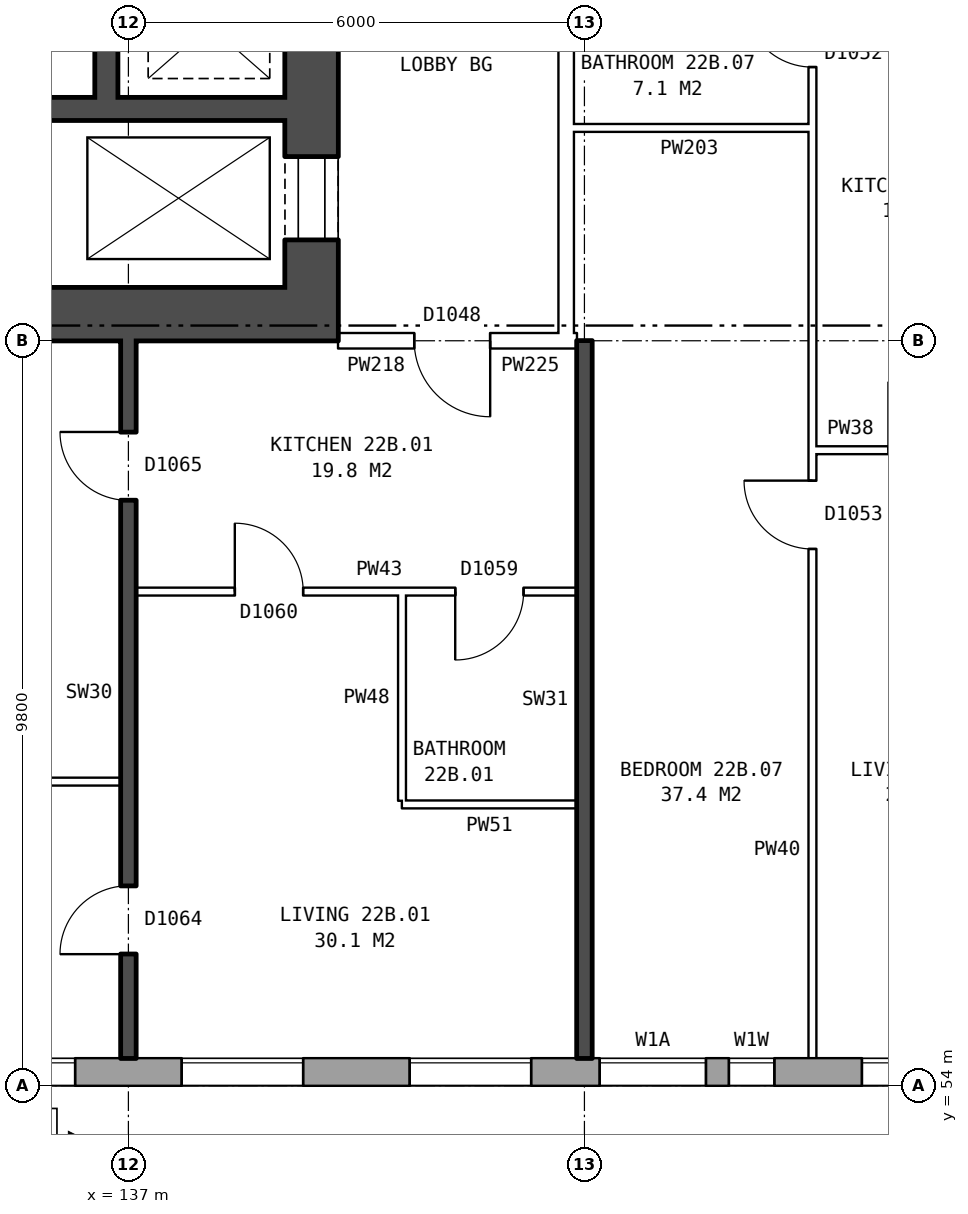
"""IFC4 building model, lengths in metres.
Left out: names, types, materials, properties, quantities, classifications, styles, units other than length and angle.
Written with IfcOpenShell. Run it as: python <this file> out.ifc"""

import sys

from ifc_helpers import new_model, si_unit, direction, frame, frame_2d, origin, place, context, subcontext, project, spatial, rectangle, extrude, element, fill, save


model = new_model("IFC4")
c1 = context("Model", 3, precision=1e-05, world=origin(), true_north=direction((0.0, 1.0)))
c2 = subcontext(c1, "Body", "Model", "MODEL_VIEW")
j1 = project(units=[si_unit("LENGTHUNIT", "METRE"), si_unit("PLANEANGLEUNIT", "RADIAN")], contexts=[c1])
p1 = place(None, origin())
s1 = spatial("IfcSite", under=j1, at=p1, CompositionType="ELEMENT")
p2 = place(p1, origin())
s2 = spatial("IfcBuilding", under=s1, at=p2, CompositionType="ELEMENT")
p3 = place(p2, frame((0.0, 0.0, 80.9)))
s3 = spatial("IfcBuildingStorey", under=s2, at=p3, CompositionType="ELEMENT", Elevation=80.9)
p4 = place(p3, frame((134.075, 54.18, 0.0), z_axis=(0.0, 0.0, 1.0), x_axis=(1.0, 0.0, 0.0)))
e1 = element("IfcWall", 1, at=p4, inside=s3, PredefinedType="STANDARD", context=c2, shape_type="SweptSolid", body=[
    extrude(rectangle(XDim=38.101, YDim=0.36, at=frame_2d((19.05, 0.0))), origin(), (0.0, 0.0, 1.0), 2.85),
])
p5 = place(p4, frame((0.625, 0.0, 0.8)))
e2 = element("IfcOpeningElement", 2, at=p5, cuts=e1, PredefinedType="OPENING", context=c2, shape_type="SweptSolid", body=[
    extrude(rectangle(XDim=1.6, YDim=1.8, at=frame_2d((0.8, 0.9))), frame((0.0, 0.19, 0.0), z_axis=(0.0, -1.0, 0.0), x_axis=(1.0, 0.0, 0.0)), (0.0, 0.0, 1.0), 0.38),
])
p6 = place(p4, frame((3.625, 0.0, 0.8)))
e3 = element("IfcOpeningElement", 3, at=p6, cuts=e1, PredefinedType="OPENING", context=c2, shape_type="SweptSolid", body=[
    extrude(rectangle(XDim=1.6, YDim=1.8, at=frame_2d((0.8, 0.9))), frame((0.0, 0.19, 0.0), z_axis=(0.0, -1.0, 0.0), x_axis=(1.0, 0.0, 0.0)), (0.0, 0.0, 1.0), 0.38),
])
p7 = place(p4, frame((6.625, 0.0, 0.8)))
e4 = element("IfcOpeningElement", 4, at=p7, cuts=e1, PredefinedType="OPENING", context=c2, shape_type="SweptSolid", body=[
    extrude(rectangle(XDim=1.6, YDim=1.8, at=frame_2d((0.8, 0.9))), frame((0.0, 0.19, 0.0), z_axis=(0.0, -1.0, 0.0), x_axis=(1.0, 0.0, 0.0)), (0.0, 0.0, 1.0), 0.38),
])
p8 = place(p4, frame((9.125, 0.0, 0.8)))
e5 = element("IfcOpeningElement", 5, at=p8, cuts=e1, PredefinedType="OPENING", context=c2, shape_type="SweptSolid", body=[
    extrude(rectangle(XDim=1.4, YDim=1.8, at=frame_2d((0.7, 0.9))), frame((0.0, 0.19, 0.0), z_axis=(0.0, -1.0, 0.0), x_axis=(1.0, 0.0, 0.0)), (0.0, 0.0, 1.0), 0.38),
])
p9 = place(p4, frame((12.575, 0.0, 0.8)))
e6 = element("IfcOpeningElement", 6, at=p9, cuts=e1, PredefinedType="OPENING", context=c2, shape_type="SweptSolid", body=[
    extrude(rectangle(XDim=0.6, YDim=0.9, at=frame_2d((0.3, 0.45))), frame((0.0, 0.19, 0.0), z_axis=(0.0, -1.0, 0.0), x_axis=(1.0, 0.0, 0.0)), (0.0, 0.0, 1.0), 0.38),
])
p10 = place(p4, frame((15.625, 0.0, 0.8)))
e7 = element("IfcOpeningElement", 7, at=p10, cuts=e1, PredefinedType="OPENING", context=c2, shape_type="SweptSolid", body=[
    extrude(rectangle(XDim=1.6, YDim=1.8, at=frame_2d((0.8, 0.9))), frame((0.0, 0.19, 0.0), z_axis=(0.0, -1.0, 0.0), x_axis=(1.0, 0.0, 0.0)), (0.0, 0.0, 1.0), 0.38),
])
p11 = place(p4, frame((18.625, 0.0, 0.8)))
e8 = element("IfcOpeningElement", 8, at=p11, cuts=e1, PredefinedType="OPENING", context=c2, shape_type="SweptSolid", body=[
    extrude(rectangle(XDim=1.6, YDim=1.8, at=frame_2d((0.8, 0.9))), frame((0.0, 0.19, 0.0), z_axis=(0.0, -1.0, 0.0), x_axis=(1.0, 0.0, 0.0)), (0.0, 0.0, 1.0), 0.38),
])
p12 = place(p4, frame((21.625, 0.0, 0.8)))
e9 = element("IfcOpeningElement", 9, at=p12, cuts=e1, PredefinedType="OPENING", context=c2, shape_type="SweptSolid", body=[
    extrude(rectangle(XDim=1.6, YDim=1.8, at=frame_2d((0.8, 0.9))), frame((0.0, 0.19, 0.0), z_axis=(0.0, -1.0, 0.0), x_axis=(1.0, 0.0, 0.0)), (0.0, 0.0, 1.0), 0.38),
])
p13 = place(p4, frame((23.525, 0.0, 0.8)))
e10 = element("IfcOpeningElement", 10, at=p13, cuts=e1, PredefinedType="OPENING", context=c2, shape_type="SweptSolid", body=[
    extrude(rectangle(XDim=1.0, YDim=1.8, at=frame_2d((0.5, 0.9))), frame((0.0, 0.19, 0.0), z_axis=(0.0, -1.0, 0.0), x_axis=(1.0, 0.0, 0.0)), (0.0, 0.0, 1.0), 0.38),
])
p14 = place(p4, frame((27.625, 0.0, 0.8)))
e11 = element("IfcOpeningElement", 11, at=p14, cuts=e1, PredefinedType="OPENING", context=c2, shape_type="SweptSolid", body=[
    extrude(rectangle(XDim=1.6, YDim=1.8, at=frame_2d((0.8, 0.9))), frame((0.0, 0.19, 0.0), z_axis=(0.0, -1.0, 0.0), x_axis=(1.0, 0.0, 0.0)), (0.0, 0.0, 1.0), 0.38),
])
p15 = place(p4, frame((30.625, 0.0, 0.8)))
e12 = element("IfcOpeningElement", 12, at=p15, cuts=e1, PredefinedType="OPENING", context=c2, shape_type="SweptSolid", body=[
    extrude(rectangle(XDim=1.6, YDim=1.8, at=frame_2d((0.8, 0.9))), frame((0.0, 0.19, 0.0), z_axis=(0.0, -1.0, 0.0), x_axis=(1.0, 0.0, 0.0)), (0.0, 0.0, 1.0), 0.38),
])
p16 = place(p4, frame((33.625, 0.0, 0.8)))
e13 = element("IfcOpeningElement", 13, at=p16, cuts=e1, PredefinedType="OPENING", context=c2, shape_type="SweptSolid", body=[
    extrude(rectangle(XDim=1.6, YDim=1.8, at=frame_2d((0.8, 0.9))), frame((0.0, 0.19, 0.0), z_axis=(0.0, -1.0, 0.0), x_axis=(1.0, 0.0, 0.0)), (0.0, 0.0, 1.0), 0.38),
])
p17 = place(p4, frame((10.825, 0.0, 1.7)))
e14 = element("IfcOpeningElement", 14, at=p17, cuts=e1, PredefinedType="OPENING", context=c2, shape_type="SweptSolid", body=[
    extrude(rectangle(XDim=0.6, YDim=0.9, at=frame_2d((0.3, 0.45))), frame((0.0, 0.19, 0.0), z_axis=(0.0, -1.0, 0.0), x_axis=(1.0, 0.0, 0.0)), (0.0, 0.0, 1.0), 0.38),
])
p18 = place(p4, frame((13.475, 0.0, 0.8)))
e15 = element("IfcOpeningElement", 15, at=p18, cuts=e1, PredefinedType="OPENING", context=c2, shape_type="SweptSolid", body=[
    extrude(rectangle(XDim=1.2, YDim=1.8, at=frame_2d((0.6, 0.9))), frame((0.0, 0.19, 0.0), z_axis=(0.0, -1.0, 0.0), x_axis=(1.0, 0.0, 0.0)), (0.0, 0.0, 1.0), 0.38),
])
p19 = place(p4, frame((24.825, 0.0, 0.8)))
e16 = element("IfcOpeningElement", 16, at=p19, cuts=e1, PredefinedType="OPENING", context=c2, shape_type="SweptSolid", body=[
    extrude(rectangle(XDim=0.6, YDim=0.9, at=frame_2d((0.3, 0.45))), frame((0.0, 0.19, 0.0), z_axis=(0.0, -1.0, 0.0), x_axis=(1.0, 0.0, 0.0)), (0.0, 0.0, 1.0), 0.38),
])
p20 = place(p3, frame((139.41, 64.5, 0.0), z_axis=(0.0, 0.0, 1.0), x_axis=(0.0, 1.0, 0.0)))
e17 = element("IfcWall", 17, at=p20, inside=s3, PredefinedType="SHEAR", context=c2, shape_type="SweptSolid", body=[
    extrude(rectangle(XDim=11.0, YDim=0.7, at=frame_2d((5.5, 0.0))), origin(), (0.0, 0.0, 1.0), 2.85),
])
p21 = place(p20, frame((0.625, 0.0, 0.0)))
e18 = element("IfcOpeningElement", 18, at=p21, cuts=e17, PredefinedType="OPENING", context=c2, shape_type="SweptSolid", body=[
    extrude(rectangle(XDim=1.1, YDim=2.1, at=frame_2d((0.55, 1.05))), frame((0.0, 0.36, 0.0), z_axis=(0.0, -1.0, 0.0), x_axis=(1.0, 0.0, 0.0)), (0.0, 0.0, 1.0), 0.72),
])
p22 = place(p20, frame((9.2, 0.0, 0.0)))
e19 = element("IfcOpeningElement", 19, at=p22, cuts=e17, PredefinedType="OPENING", context=c2, shape_type="SweptSolid", body=[
    extrude(rectangle(XDim=1.1, YDim=2.1, at=frame_2d((0.55, 1.05))), frame((0.0, 0.36, 0.0), z_axis=(0.0, -1.0, 0.0), x_axis=(1.0, 0.0, 0.0)), (0.0, 0.0, 1.0), 0.72),
])
p23 = place(p20, frame((7.425, 0.0, 0.0)))
e20 = element("IfcOpeningElement", 20, at=p23, cuts=e17, PredefinedType="OPENING", context=c2, shape_type="SweptSolid", body=[
    extrude(rectangle(XDim=0.85, YDim=2.1, at=frame_2d((0.425, 1.05))), frame((0.0, 0.36, 0.0), z_axis=(0.0, -1.0, 0.0), x_axis=(1.0, 0.0, 0.0)), (0.0, 0.0, 1.0), 0.72),
])
p24 = place(p3, frame((139.76, 64.15, 0.0), z_axis=(0.0, 0.0, 1.0), x_axis=(-1.0, 0.0, 0.0)))
e21 = element("IfcWall", 21, at=p24, inside=s3, PredefinedType="SHEAR", context=c2, shape_type="SweptSolid", body=[
    extrude(rectangle(XDim=8.4, YDim=0.7, at=frame_2d((4.2, 0.0))), origin(), (0.0, 0.0, 1.0), 2.85),
])
p25 = place(p3, frame((139.06, 66.85, 0.0), z_axis=(0.0, 0.0, 1.0), x_axis=(-1.0, 0.0, 0.0)))
e22 = element("IfcWall", 22, at=p25, inside=s3, PredefinedType="SHEAR", context=c2, shape_type="SweptSolid", body=[
    extrude(rectangle(XDim=4.15, YDim=0.3, at=frame_2d((2.075, 0.0))), origin(), (0.0, 0.0, 1.0), 2.85),
])
p26 = place(p3, frame((136.71, 67.0, 0.0), z_axis=(0.0, 0.0, 1.0), x_axis=(0.0, 1.0, 0.0)))
e23 = element("IfcWall", 23, at=p26, inside=s3, PredefinedType="SHEAR", context=c2, shape_type="SweptSolid", body=[
    extrude(rectangle(XDim=4.1, YDim=0.3, at=frame_2d((2.05, 0.0))), origin(), (0.0, 0.0, 1.0), 2.85),
])
p27 = place(p3, frame((142.76, 63.9, 0.0), z_axis=(0.0, 0.0, 1.0), x_axis=(0.0, 1.0, 0.0)))
e24 = element("IfcWall", 24, at=p27, inside=s3, PredefinedType="PARTITIONING", context=c2, shape_type="SweptSolid", body=[
    extrude(rectangle(XDim=12.2, YDim=0.2, at=frame_2d((6.1, 0.0))), origin(), (0.0, 0.0, 1.0), 2.85),
])
p28 = place(p27, frame((5.1, 0.0, 0.0)))
e25 = element("IfcOpeningElement", 25, at=p28, cuts=e24, PredefinedType="OPENING", context=c2, shape_type="SweptSolid", body=[
    extrude(rectangle(XDim=2.0, YDim=2.1, at=frame_2d((1.0, 1.05))), frame((0.0, 0.11, 0.0), z_axis=(0.0, -1.0, 0.0), x_axis=(1.0, 0.0, 0.0)), (0.0, 0.0, 1.0), 0.22),
])
p29 = place(p3, frame((140.6, 57.7, 0.0), z_axis=(0.0, 0.0, 1.0), x_axis=(1.0, 0.0, 0.0)))
e26 = element("IfcWall", 26, at=p29, inside=s3, PredefinedType="PARTITIONING", context=c2, shape_type="SweptSolid", body=[
    extrude(rectangle(XDim=2.3, YDim=0.1, at=frame_2d((1.15, 0.0))), origin(), (0.0, 0.0, 1.0), 2.85),
])
p30 = place(p3, frame((131.36, 58.0, 0.0), z_axis=(0.0, 0.0, 1.0), x_axis=(1.0, 0.0, 0.0)))
e27 = element("IfcWall", 27, at=p30, inside=s3, PredefinedType="PARTITIONING", context=c2, shape_type="SweptSolid", body=[
    extrude(rectangle(XDim=5.54, YDim=0.1, at=frame_2d((2.77, 0.0))), origin(), (0.0, 0.0, 1.0), 2.85),
])
p31 = place(p3, frame((137.1, 60.5, 0.0), z_axis=(0.0, 0.0, 1.0), x_axis=(1.0, 0.0, 0.0)))
e28 = element("IfcWall", 28, at=p31, inside=s3, PredefinedType="PARTITIONING", context=c2, shape_type="SweptSolid", body=[
    extrude(rectangle(XDim=5.8, YDim=0.1, at=frame_2d((2.9, 0.0))), origin(), (0.0, 0.0, 1.0), 2.85),
])
p32 = place(p31, frame((1.3, 0.0, 0.0)))
e29 = element("IfcOpeningElement", 29, at=p32, cuts=e28, PredefinedType="OPENING", context=c2, shape_type="SweptSolid", body=[
    extrude(rectangle(XDim=0.9, YDim=2.1, at=frame_2d((0.45, 1.05))), frame((0.0, 0.06, 0.0), z_axis=(0.0, -1.0, 0.0), x_axis=(1.0, 0.0, 0.0)), (0.0, 0.0, 1.0), 0.12),
])
p33 = place(p31, frame((4.2, 0.0, 0.0)))
e30 = element("IfcOpeningElement", 30, at=p33, cuts=e28, PredefinedType="OPENING", context=c2, shape_type="SweptSolid", body=[
    extrude(rectangle(XDim=0.9, YDim=2.1, at=frame_2d((0.45, 1.05))), frame((0.0, 0.06, 0.0), z_axis=(0.0, -1.0, 0.0), x_axis=(1.0, 0.0, 0.0)), (0.0, 0.0, 1.0), 0.12),
])
p34 = place(p3, frame((146.0, 62.36, 0.0), z_axis=(0.0, 0.0, 1.0), x_axis=(1.0, 0.0, 0.0)))
e31 = element("IfcWall", 31, at=p34, inside=s3, PredefinedType="PARTITIONING", context=c2, shape_type="SweptSolid", body=[
    extrude(rectangle(XDim=2.9, YDim=0.1, at=frame_2d((1.45, 0.0))), origin(), (0.0, 0.0, 1.0), 2.85),
])
p35 = place(p34, frame((1.0, 0.0, 0.0)))
e32 = element("IfcOpeningElement", 32, at=p35, cuts=e31, PredefinedType="OPENING", context=c2, shape_type="SweptSolid", body=[
    extrude(rectangle(XDim=0.9, YDim=2.1, at=frame_2d((0.45, 1.05))), frame((0.0, 0.06, 0.0), z_axis=(0.0, -1.0, 0.0), x_axis=(1.0, 0.0, 0.0)), (0.0, 0.0, 1.0), 0.12),
])
p36 = place(p3, frame((139.76, 63.8, 0.0), z_axis=(0.0, 0.0, 1.0), x_axis=(1.0, 0.0, 0.0)))
e33 = element("IfcWall", 33, at=p36, inside=s3, PredefinedType="PARTITIONING", context=c2, shape_type="SweptSolid", body=[
    extrude(rectangle(XDim=3.0, YDim=0.2, at=frame_2d((1.5, 0.0))), origin(), (0.0, 0.0, 1.0), 2.85),
])
p37 = place(p36, frame((1.0, 0.0, 0.0)))
e34 = element("IfcOpeningElement", 34, at=p37, cuts=e33, PredefinedType="OPENING", context=c2, shape_type="SweptSolid", body=[
    extrude(rectangle(XDim=1.0, YDim=2.1, at=frame_2d((0.5, 1.05))), frame((0.0, 0.11, 0.0), z_axis=(0.0, -1.0, 0.0), x_axis=(1.0, 0.0, 0.0)), (0.0, 0.0, 1.0), 0.22),
])
p38 = place(p3, frame((142.76, 63.8, 0.0), z_axis=(0.0, 0.0, 1.0), x_axis=(1.0, 0.0, 0.0)))
e35 = element("IfcWall", 35, at=p38, inside=s3, PredefinedType="PARTITIONING", context=c2, shape_type="SweptSolid", body=[
    extrude(rectangle(XDim=0.14, YDim=0.2, at=frame_2d((0.07, 0.0))), origin(), (0.0, 0.0, 1.0), 2.85),
])
p39 = place(p3, frame((142.76, 66.6, 0.0), z_axis=(0.0, 0.0, 1.0), x_axis=(1.0, 0.0, 0.0)))
e36 = element("IfcWall", 36, at=p39, inside=s3, PredefinedType="PARTITIONING", context=c2, shape_type="SweptSolid", body=[
    extrude(rectangle(XDim=3.24, YDim=0.1, at=frame_2d((1.62, 0.0))), origin(), (0.0, 0.0, 1.0), 2.85),
])
p40 = place(p3, frame((137.0, 54.36, 0.0), z_axis=(0.0, 0.0, 1.0), x_axis=(0.0, 1.0, 0.0)))
e37 = element("IfcWall", 37, at=p40, inside=s3, PredefinedType="SOLIDWALL", context=c2, shape_type="SweptSolid", body=[
    extrude(rectangle(XDim=9.44, YDim=0.2, at=frame_2d((4.72, 0.0))), origin(), (0.0, 0.0, 1.0), 2.85),
])
p41 = place(p40, frame((1.37, 0.0, 0.0)))
e38 = element("IfcOpeningElement", 38, at=p41, cuts=e37, PredefinedType="OPENING", context=c2, shape_type="SweptSolid", body=[
    extrude(rectangle(XDim=0.9, YDim=2.1, at=frame_2d((0.45, 1.05))), frame((0.0, 0.11, 0.0), z_axis=(0.0, -1.0, 0.0), x_axis=(1.0, 0.0, 0.0)), (0.0, 0.0, 1.0), 0.22),
])
p42 = place(p40, frame((7.34, 0.0, 0.0)))
e39 = element("IfcOpeningElement", 39, at=p42, cuts=e37, PredefinedType="OPENING", context=c2, shape_type="SweptSolid", body=[
    extrude(rectangle(XDim=0.9, YDim=2.1, at=frame_2d((0.45, 1.05))), frame((0.0, 0.11, 0.0), z_axis=(0.0, -1.0, 0.0), x_axis=(1.0, 0.0, 0.0)), (0.0, 0.0, 1.0), 0.22),
])
p43 = place(p3, frame((140.6, 57.75, 0.0), z_axis=(0.0, 0.0, 1.0), x_axis=(0.0, 1.0, 0.0)))
e40 = element("IfcWall", 40, at=p43, inside=s3, PredefinedType="PARTITIONING", context=c2, shape_type="SweptSolid", body=[
    extrude(rectangle(XDim=2.7, YDim=0.1, at=frame_2d((1.35, 0.0))), origin(), (0.0, 0.0, 1.0), 2.85),
])
p44 = place(p3, frame((143.0, 54.36, 0.0), z_axis=(0.0, 0.0, 1.0), x_axis=(0.0, 1.0, 0.0)))
e41 = element("IfcWall", 41, at=p44, inside=s3, PredefinedType="SOLIDWALL", context=c2, shape_type="SweptSolid", body=[
    extrude(rectangle(XDim=9.44, YDim=0.2, at=frame_2d((4.72, 0.0))), origin(), (0.0, 0.0, 1.0), 2.85),
])
p45 = place(p3, frame((146.0, 54.36, 0.0), z_axis=(0.0, 0.0, 1.0), x_axis=(0.0, 1.0, 0.0)))
e42 = element("IfcWall", 42, at=p45, inside=s3, PredefinedType="PARTITIONING", context=c2, shape_type="SweptSolid", body=[
    extrude(rectangle(XDim=14.34, YDim=0.1, at=frame_2d((7.17, 0.0))), origin(), (0.0, 0.0, 1.0), 2.85),
])
p46 = place(p45, frame((6.7, 0.0, 0.0)))
e43 = element("IfcOpeningElement", 43, at=p46, cuts=e42, PredefinedType="OPENING", context=c2, shape_type="SweptSolid", body=[
    extrude(rectangle(XDim=0.9, YDim=2.1, at=frame_2d((0.45, 1.05))), frame((0.0, 0.06, 0.0), z_axis=(0.0, -1.0, 0.0), x_axis=(1.0, 0.0, 0.0)), (0.0, 0.0, 1.0), 0.12),
])
p47 = place(p45, frame((13.04, 0.0, 0.0)))
e44 = element("IfcOpeningElement", 44, at=p47, cuts=e42, PredefinedType="OPENING", context=c2, shape_type="SweptSolid", body=[
    extrude(rectangle(XDim=0.9, YDim=2.1, at=frame_2d((0.45, 1.05))), frame((0.0, 0.06, 0.0), z_axis=(0.0, -1.0, 0.0), x_axis=(1.0, 0.0, 0.0)), (0.0, 0.0, 1.0), 0.12),
])
p48 = place(p5, origin())
e45 = element("IfcWindow", 45, at=p48, inside=s3, PartitioningType="SINGLE_PANEL", PredefinedType="WINDOW", context=c2, shape_type="SweptSolid", body=[
    extrude(rectangle(XDim=1.6, YDim=1.8, at=frame_2d((0.8, 0.9))), frame((0.0, 0.15, 0.0), z_axis=(0.0, -1.0, 0.0), x_axis=(1.0, 0.0, 0.0)), (0.0, 0.0, 1.0), 0.06),
])
fill(e2, e45)
p49 = place(p6, origin())
e46 = element("IfcWindow", 46, at=p49, inside=s3, PartitioningType="SINGLE_PANEL", PredefinedType="WINDOW", context=c2, shape_type="SweptSolid", body=[
    extrude(rectangle(XDim=1.6, YDim=1.8, at=frame_2d((0.8, 0.9))), frame((0.0, 0.15, 0.0), z_axis=(0.0, -1.0, 0.0), x_axis=(1.0, 0.0, 0.0)), (0.0, 0.0, 1.0), 0.06),
])
fill(e3, e46)
p50 = place(p7, origin())
e47 = element("IfcWindow", 47, at=p50, inside=s3, PartitioningType="SINGLE_PANEL", PredefinedType="WINDOW", context=c2, shape_type="SweptSolid", body=[
    extrude(rectangle(XDim=1.6, YDim=1.8, at=frame_2d((0.8, 0.9))), frame((0.0, 0.15, 0.0), z_axis=(0.0, -1.0, 0.0), x_axis=(1.0, 0.0, 0.0)), (0.0, 0.0, 1.0), 0.06),
])
fill(e4, e47)
p51 = place(p8, origin())
e48 = element("IfcWindow", 48, at=p51, inside=s3, PartitioningType="SINGLE_PANEL", PredefinedType="WINDOW", context=c2, shape_type="SweptSolid", body=[
    extrude(rectangle(XDim=1.4, YDim=1.8, at=frame_2d((0.7, 0.9))), frame((0.0, 0.15, 0.0), z_axis=(0.0, -1.0, 0.0), x_axis=(1.0, 0.0, 0.0)), (0.0, 0.0, 1.0), 0.06),
])
fill(e5, e48)
p52 = place(p9, origin())
e49 = element("IfcWindow", 49, at=p52, inside=s3, PartitioningType="SINGLE_PANEL", PredefinedType="WINDOW", context=c2, shape_type="SweptSolid", body=[
    extrude(rectangle(XDim=0.6, YDim=0.9, at=frame_2d((0.3, 0.45))), frame((0.0, 0.15, 0.0), z_axis=(0.0, -1.0, 0.0), x_axis=(1.0, 0.0, 0.0)), (0.0, 0.0, 1.0), 0.06),
])
fill(e6, e49)
p53 = place(p21, origin())
e50 = element("IfcDoor", 50, at=p53, inside=s3, OperationType="DOUBLE_DOOR_SLIDING", PredefinedType="DOOR", context=c2, shape_type="SweptSolid", body=[
    extrude(rectangle(XDim=1.1, YDim=2.1, at=frame_2d((0.55, 1.05))), frame((0.0, 0.335, 0.0), z_axis=(0.0, -1.0, 0.0), x_axis=(1.0, 0.0, 0.0)), (0.0, 0.0, 1.0), 0.05),
])
fill(e18, e50)
p54 = place(p41, origin())
e51 = element("IfcDoor", 51, at=p54, inside=s3, OperationType="SINGLE_SWING_LEFT", PredefinedType="DOOR", context=c2, shape_type="SweptSolid", body=[
    extrude(rectangle(XDim=0.9, YDim=2.1, at=frame_2d((0.45, 1.05))), frame((0.0, 0.025, 0.0), z_axis=(0.0, -1.0, 0.0), x_axis=(1.0, 0.0, 0.0)), (0.0, 0.0, 1.0), 0.05),
])
fill(e38, e51)
p55 = place(p42, origin())
e52 = element("IfcDoor", 52, at=p55, inside=s3, OperationType="SINGLE_SWING_RIGHT", PredefinedType="DOOR", context=c2, shape_type="SweptSolid", body=[
    extrude(rectangle(XDim=0.9, YDim=2.1, at=frame_2d((0.45, 1.05))), frame((0.0, 0.025, 0.0), z_axis=(0.0, -1.0, 0.0), x_axis=(1.0, 0.0, 0.0)), (0.0, 0.0, 1.0), 0.05),
])
fill(e39, e52)
p56 = place(p37, frame((1.0, 0.0, 0.0), z_axis=(0.0, 0.0, 1.0), x_axis=(-1.0, 0.0, 0.0)))
e53 = element("IfcDoor", 53, at=p56, inside=s3, OperationType="SINGLE_SWING_LEFT", PredefinedType="DOOR", context=c2, shape_type="SweptSolid", body=[
    extrude(rectangle(XDim=1.0, YDim=2.1, at=frame_2d((0.5, 1.05))), frame((0.0, 0.025, 0.0), z_axis=(0.0, -1.0, 0.0), x_axis=(1.0, 0.0, 0.0)), (0.0, 0.0, 1.0), 0.05),
])
fill(e34, e53)
p57 = place(p32, origin())
e54 = element("IfcDoor", 54, at=p57, inside=s3, OperationType="SINGLE_SWING_LEFT", PredefinedType="DOOR", context=c2, shape_type="SweptSolid", body=[
    extrude(rectangle(XDim=0.9, YDim=2.1, at=frame_2d((0.45, 1.05))), frame((0.0, 0.025, 0.0), z_axis=(0.0, -1.0, 0.0), x_axis=(1.0, 0.0, 0.0)), (0.0, 0.0, 1.0), 0.05),
])
fill(e29, e54)
p58 = place(p33, frame((0.9, 0.0, 0.0), z_axis=(0.0, 0.0, 1.0), x_axis=(-1.0, 0.0, 0.0)))
e55 = element("IfcDoor", 55, at=p58, inside=s3, OperationType="SINGLE_SWING_RIGHT", PredefinedType="DOOR", context=c2, shape_type="SweptSolid", body=[
    extrude(rectangle(XDim=0.9, YDim=2.1, at=frame_2d((0.45, 1.05))), frame((0.0, 0.025, 0.0), z_axis=(0.0, -1.0, 0.0), x_axis=(1.0, 0.0, 0.0)), (0.0, 0.0, 1.0), 0.05),
])
fill(e30, e55)
p59 = place(p46, origin())
e56 = element("IfcDoor", 56, at=p59, inside=s3, OperationType="SINGLE_SWING_RIGHT", PredefinedType="DOOR", context=c2, shape_type="SweptSolid", body=[
    extrude(rectangle(XDim=0.9, YDim=2.1, at=frame_2d((0.45, 1.05))), frame((0.0, 0.025, 0.0), z_axis=(0.0, -1.0, 0.0), x_axis=(1.0, 0.0, 0.0)), (0.0, 0.0, 1.0), 0.05),
])
fill(e43, e56)
p60 = place(p47, origin())
e57 = element("IfcDoor", 57, at=p60, inside=s3, OperationType="SINGLE_SWING_RIGHT", PredefinedType="DOOR", context=c2, shape_type="SweptSolid", body=[
    extrude(rectangle(XDim=0.9, YDim=2.1, at=frame_2d((0.45, 1.05))), frame((0.0, 0.025, 0.0), z_axis=(0.0, -1.0, 0.0), x_axis=(1.0, 0.0, 0.0)), (0.0, 0.0, 1.0), 0.05),
])
fill(e44, e57)
p61 = place(p17, origin())
e58 = element("IfcWindow", 58, at=p61, inside=s3, PartitioningType="SINGLE_PANEL", PredefinedType="WINDOW", context=c2, shape_type="SweptSolid", body=[
    extrude(rectangle(XDim=0.6, YDim=0.9, at=frame_2d((0.3, 0.45))), frame((0.0, 0.15, 0.0), z_axis=(0.0, -1.0, 0.0), x_axis=(1.0, 0.0, 0.0)), (0.0, 0.0, 1.0), 0.06),
])
fill(e14, e58)
save(model, sys.argv[1])
